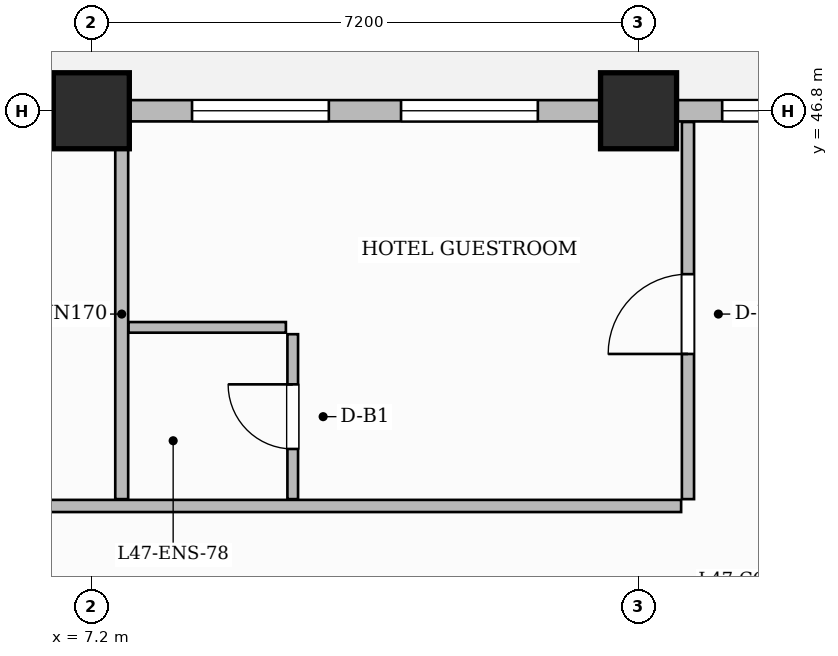
"""IFC4 building model, lengths in metres.
Left out: names, types, materials, properties, quantities, classifications, styles, units other than length and angle.
Written with IfcOpenShell. Run it as: python <this file> out.ifc"""

import sys

from ifc_helpers import new_model, si_unit, direction, frame, frame_2d, origin, origin_2d, place, context, subcontext, project, spatial, rectangle, extrude, source, transform, mapped, element, fill, save


model = new_model("IFC4")
c1 = context("Model", 3, precision=1e-05, world=origin(), true_north=direction((0.0, 1.0)))
c2 = subcontext(c1, "Body", "Model", "MODEL_VIEW")
j1 = project(units=[si_unit("LENGTHUNIT", "METRE"), si_unit("PLANEANGLEUNIT", "RADIAN")], contexts=[c1])
p1 = place(None, origin())
s1 = spatial("IfcSite", under=j1, at=p1, CompositionType="ELEMENT")
p2 = place(p1, origin())
s2 = spatial("IfcBuilding", under=s1, at=p2, CompositionType="ELEMENT")
p3 = place(p2, frame((0.0, 0.0, 188.8)))
s3 = spatial("IfcBuildingStorey", under=s2, at=p3, CompositionType="ELEMENT", Elevation=188.8)
m1 = source(origin(), c2, "Body", "SweptSolid", [
    extrude(rectangle(XDim=1.0, YDim=1.0, at=origin_2d()), origin(), (0.0, 0.0, 1.0), 3.85),
])
for number, where, z_axis, x_axis in (
    (1, (7.2, 46.8, 0.0), (0.0, 0.0, 1.0), (1.0, 0.0, 0.0)),
    (2, (14.4, 46.8, 0.0), (0.0, 0.0, 1.0), (1.0, 0.0, 0.0)),
):
    element("IfcColumn", number, at=place(p3, frame(where, z_axis=z_axis, x_axis=x_axis)), inside=s3, PredefinedType="COLUMN", context=c2, shape_type="MappedRepresentation", body=[
        mapped(m1, transform((0.0, 0.0, 0.0), scale=1.0)),
    ])
p4 = place(p3, frame((15.05, 41.69, 0.0), z_axis=(0.0, 0.0, 1.0), x_axis=(0.0, 1.0, 0.0)))
e3 = element("IfcWall", 3, at=p4, inside=s3, PredefinedType="PARTITIONING", context=c2, shape_type="SweptSolid", body=[
    extrude(rectangle(XDim=4.962, YDim=0.16, at=frame_2d((2.481, 0.0))), origin(), (0.0, 0.0, 1.0), 3.6),
])
p5 = place(p4, frame((1.91, 0.0, 0.0)))
e4 = element("IfcOpeningElement", 4, at=p5, cuts=e3, PredefinedType="OPENING", context=c2, shape_type="SweptSolid", body=[
    extrude(rectangle(XDim=1.05, YDim=2.25, at=frame_2d((0.525, 1.125))), frame((0.0, 0.09, 0.0), z_axis=(0.0, -1.0, 0.0), x_axis=(1.0, 0.0, 0.0)), (0.0, 0.0, 1.0), 0.18),
])
p6 = place(p3, frame((7.6, 41.69, 0.0), z_axis=(0.0, 0.0, 1.0), x_axis=(0.0, 1.0, 0.0)))
e5 = element("IfcWall", 5, at=p6, inside=s3, PredefinedType="PARTITIONING", context=c2, shape_type="SweptSolid", body=[
    extrude(rectangle(XDim=4.87, YDim=0.17, at=frame_2d((2.435, 0.0))), origin(), (0.0, 0.0, 1.0), 3.6),
])
p7 = place(p3, frame((0.148, 41.6, 0.0), z_axis=(0.0, 0.0, 1.0), x_axis=(1.0, 0.0, 0.0)))
e6 = element("IfcWall", 6, at=p7, inside=s3, PredefinedType="PARTITIONING", context=c2, shape_type="SweptSolid", body=[
    extrude(rectangle(XDim=14.812, YDim=0.16, at=frame_2d((7.406, 0.0))), origin(), (0.0, 0.0, 1.0), 3.085),
])
p8 = place(p7, frame((4.877, 0.0, 0.0)))
e7 = element("IfcOpeningElement", 7, at=p8, cuts=e6, PredefinedType="OPENING", context=c2, shape_type="SweptSolid", body=[
    extrude(rectangle(XDim=0.95, YDim=2.15, at=frame_2d((0.475, 1.075))), frame((0.0, 0.09, 0.0), z_axis=(0.0, -1.0, 0.0), x_axis=(1.0, 0.0, 0.0)), (0.0, 0.0, 1.0), 0.18),
])
p9 = place(p3, frame((7.69, 43.95, 0.0), z_axis=(0.0, 0.0, 1.0), x_axis=(1.0, 0.0, 0.0)))
e8 = element("IfcWall", 8, at=p9, inside=s3, PredefinedType="PARTITIONING", context=c2, shape_type="SweptSolid", body=[
    extrude(rectangle(XDim=2.07, YDim=0.14, at=frame_2d((1.035, 0.0))), origin(), (0.0, 0.0, 1.0), 3.085),
])
p10 = place(p3, frame((9.85, 41.69, 0.0), z_axis=(0.0, 0.0, 1.0), x_axis=(0.0, 1.0, 0.0)))
e9 = element("IfcWall", 9, at=p10, inside=s3, PredefinedType="PARTITIONING", context=c2, shape_type="SweptSolid", body=[
    extrude(rectangle(XDim=2.17, YDim=0.14, at=frame_2d((1.085, 0.0))), origin(), (0.0, 0.0, 1.0), 3.6),
])
p11 = place(p10, frame((0.66, 0.0, 0.0)))
e10 = element("IfcOpeningElement", 10, at=p11, cuts=e9, PredefinedType="OPENING", context=c2, shape_type="SweptSolid", body=[
    extrude(rectangle(XDim=0.85, YDim=2.1, at=frame_2d((0.425, 1.05))), frame((0.0, 0.08, 0.0), z_axis=(0.0, -1.0, 0.0), x_axis=(1.0, 0.0, 0.0)), (0.0, 0.0, 1.0), 0.16),
])
p12 = place(p3, frame((0.0, 46.8, 0.0), z_axis=(0.0, 0.0, 1.0), x_axis=(1.0, 0.0, 0.0)))
e11 = element("IfcWall", 11, at=p12, inside=s3, PredefinedType="SOLIDWALL", context=c2, shape_type="SweptSolid", body=[
    extrude(rectangle(XDim=18.0, YDim=0.28, at=frame_2d((9.0, 0.0))), origin(), (0.0, 0.0, 1.0), 3.085),
])
p13 = place(p12, frame((1.325, 0.0, 0.8)))
e12 = element("IfcOpeningElement", 12, at=p13, cuts=e11, PredefinedType="OPENING", context=c2, shape_type="SweptSolid", body=[
    extrude(rectangle(XDim=1.8, YDim=1.85, at=frame_2d((0.9, 0.925))), frame((0.0, 0.15, 0.0), z_axis=(0.0, -1.0, 0.0), x_axis=(1.0, 0.0, 0.0)), (0.0, 0.0, 1.0), 0.3),
])
p14 = place(p12, frame((4.075, 0.0, 0.8)))
e13 = element("IfcOpeningElement", 13, at=p14, cuts=e11, PredefinedType="OPENING", context=c2, shape_type="SweptSolid", body=[
    extrude(rectangle(XDim=1.8, YDim=1.85, at=frame_2d((0.9, 0.925))), frame((0.0, 0.15, 0.0), z_axis=(0.0, -1.0, 0.0), x_axis=(1.0, 0.0, 0.0)), (0.0, 0.0, 1.0), 0.3),
])
p15 = place(p12, frame((8.525, 0.0, 0.8)))
e14 = element("IfcOpeningElement", 14, at=p15, cuts=e11, PredefinedType="OPENING", context=c2, shape_type="SweptSolid", body=[
    extrude(rectangle(XDim=1.8, YDim=1.85, at=frame_2d((0.9, 0.925))), frame((0.0, 0.15, 0.0), z_axis=(0.0, -1.0, 0.0), x_axis=(1.0, 0.0, 0.0)), (0.0, 0.0, 1.0), 0.3),
])
p16 = place(p12, frame((11.275, 0.0, 0.8)))
e15 = element("IfcOpeningElement", 15, at=p16, cuts=e11, PredefinedType="OPENING", context=c2, shape_type="SweptSolid", body=[
    extrude(rectangle(XDim=1.8, YDim=1.85, at=frame_2d((0.9, 0.925))), frame((0.0, 0.15, 0.0), z_axis=(0.0, -1.0, 0.0), x_axis=(1.0, 0.0, 0.0)), (0.0, 0.0, 1.0), 0.3),
])
p17 = place(p12, frame((15.5, 0.0, 0.8)))
e16 = element("IfcOpeningElement", 16, at=p17, cuts=e11, PredefinedType="OPENING", context=c2, shape_type="SweptSolid", body=[
    extrude(rectangle(XDim=1.4, YDim=1.85, at=frame_2d((0.7, 0.925))), frame((0.0, 0.15, 0.0), z_axis=(0.0, -1.0, 0.0), x_axis=(1.0, 0.0, 0.0)), (0.0, 0.0, 1.0), 0.3),
])
m2 = source(origin(), c2, "Body", "SweptSolid", [
    extrude(rectangle(XDim=0.85, YDim=2.1, at=frame_2d((0.425, 1.05))), frame((0.0, 0.025, 0.0), z_axis=(0.0, -1.0, 0.0), x_axis=(1.0, 0.0, 0.0)), (0.0, 0.0, 1.0), 0.05),
])
p18 = place(p11, origin())
e17 = element("IfcDoor", 17, at=p18, inside=s3, OperationType="SINGLE_SWING_RIGHT", PredefinedType="DOOR", context=c2, shape_type="MappedRepresentation", body=[
    mapped(m2, transform((0.0, 0.0, 0.0), scale=1.0)),
])
fill(e10, e17)
m3 = source(origin(), c2, "Body", "SweptSolid", [
    extrude(rectangle(XDim=1.05, YDim=2.25, at=frame_2d((0.525, 1.125))), frame((0.0, 0.025, 0.0), z_axis=(0.0, -1.0, 0.0), x_axis=(1.0, 0.0, 0.0)), (0.0, 0.0, 1.0), 0.05),
])
p19 = place(p5, origin())
e18 = element("IfcDoor", 18, at=p19, inside=s3, OperationType="SINGLE_SWING_LEFT", PredefinedType="DOOR", context=c2, shape_type="MappedRepresentation", body=[
    mapped(m3, transform((0.0, 0.0, 0.0), scale=1.0)),
])
fill(e4, e18)
m4 = source(origin(), c2, "Body", "SweptSolid", [
    extrude(rectangle(XDim=1.8, YDim=1.85, at=frame_2d((0.9, 0.925))), frame((0.0, 0.03, 0.0), z_axis=(0.0, -1.0, 0.0), x_axis=(1.0, 0.0, 0.0)), (0.0, 0.0, 1.0), 0.06),
])
p20 = place(p15, origin())
e19 = element("IfcWindow", 19, at=p20, inside=s3, PartitioningType="DOUBLE_PANEL_VERTICAL", PredefinedType="WINDOW", context=c2, shape_type="MappedRepresentation", body=[
    mapped(m4, transform((0.0, 0.0, 0.0), scale=1.0)),
])
fill(e14, e19)
p21 = place(p16, origin())
e20 = element("IfcWindow", 20, at=p21, inside=s3, PartitioningType="DOUBLE_PANEL_VERTICAL", PredefinedType="WINDOW", context=c2, shape_type="MappedRepresentation", body=[
    mapped(m4, transform((0.0, 0.0, 0.0), scale=1.0)),
])
fill(e15, e20)
m5 = source(origin(), c2, "Body", "SweptSolid", [
    extrude(rectangle(XDim=1.4, YDim=1.85, at=frame_2d((0.7, 0.925))), frame((0.0, 0.03, 0.0), z_axis=(0.0, -1.0, 0.0), x_axis=(1.0, 0.0, 0.0)), (0.0, 0.0, 1.0), 0.06),
])
p22 = place(p17, origin())
e21 = element("IfcWindow", 21, at=p22, inside=s3, PartitioningType="SINGLE_PANEL", PredefinedType="WINDOW", context=c2, shape_type="MappedRepresentation", body=[
    mapped(m5, transform((0.0, 0.0, 0.0), scale=1.0)),
])
fill(e16, e21)
save(model, sys.argv[1])
